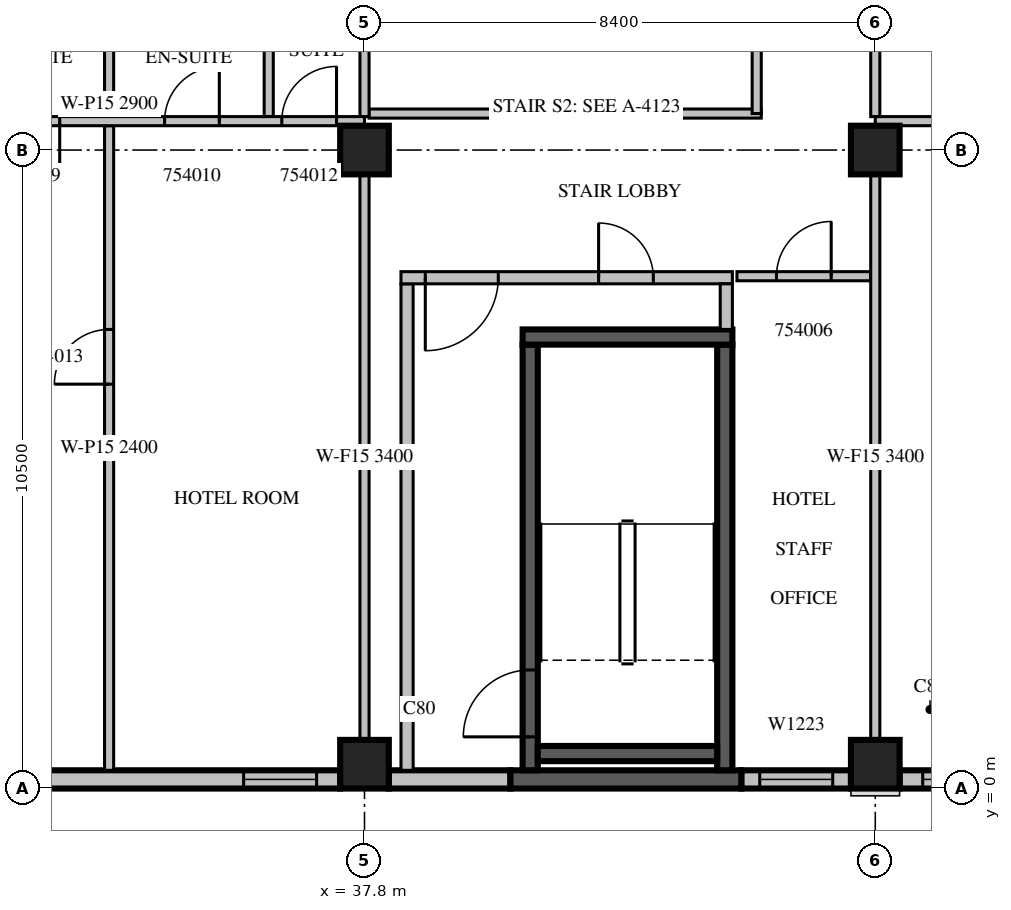
"""IFC4 building model, lengths in metres.
Left out: names, types, materials, properties, quantities, classifications, styles, units other than length and angle.
Written with IfcOpenShell. Run it as: python <this file> out.ifc"""

import sys

from ifc_helpers import new_model, si_unit, direction, frame, frame_2d, origin, origin_2d, place, context, subcontext, project, spatial, rectangle, extrude, source, transform, mapped, element, fill, save


model = new_model("IFC4")
c1 = context("Model", 3, precision=1e-05, world=origin(), true_north=direction((0.0, 1.0)))
c2 = subcontext(c1, "Body", "Model", "MODEL_VIEW")
j1 = project(units=[si_unit("LENGTHUNIT", "METRE"), si_unit("PLANEANGLEUNIT", "RADIAN")], contexts=[c1])
p1 = place(None, origin())
s1 = spatial("IfcSite", under=j1, at=p1, CompositionType="ELEMENT")
p2 = place(p1, origin())
s2 = spatial("IfcBuilding", under=s1, at=p2, CompositionType="ELEMENT")
p3 = place(p2, frame((0.0, 0.0, 238.6)))
s3 = spatial("IfcBuildingStorey", under=s2, at=p3, CompositionType="ELEMENT", Elevation=238.6)
m1 = source(origin(), c2, "Body", "SweptSolid", [
    extrude(rectangle(XDim=0.8, YDim=0.8, at=origin_2d()), origin(), (0.0, 0.0, 1.0), 3.8),
])
for number, where, z_axis, x_axis in (
    (1, (37.8, 0.4, 0.0), (0.0, 0.0, 1.0), (1.0, 0.0, 0.0)),
    (2, (46.2, 0.4, 0.0), (0.0, 0.0, 1.0), (1.0, 0.0, 0.0)),
    (3, (37.8, 10.5, 0.0), (0.0, 0.0, 1.0), (1.0, 0.0, 0.0)),
    (4, (46.2, 10.5, 0.0), (0.0, 0.0, 1.0), (1.0, 0.0, 0.0)),
):
    element("IfcColumn", number, at=place(p3, frame(where, z_axis=z_axis, x_axis=x_axis)), inside=s3, PredefinedType="COLUMN", context=c2, shape_type="MappedRepresentation", body=[
        mapped(m1, transform((0.0, 0.0, 0.0), scale=1.0)),
    ])
m2 = source(origin(), c2, "Body", "SweptSolid", [
    extrude(rectangle(XDim=7.6, YDim=0.3, at=frame_2d((3.8, 0.0))), origin(), (0.0, 0.0, 1.0), 3.4),
])
p4 = place(p3, frame((29.8, 0.15, 0.0), z_axis=(0.0, 0.0, 1.0), x_axis=(1.0, 0.0, 0.0)))
e5 = element("IfcWall", 5, at=p4, inside=s3, PredefinedType="STANDARD", context=c2, shape_type="MappedRepresentation", body=[
    mapped(m2, transform((0.0, 0.0, 0.0), scale=1.0)),
])
m3 = source(origin(), c2, "Body", "SweptSolid", [
    extrude(rectangle(XDim=1.2, YDim=2.3, at=frame_2d((0.6, 1.15))), frame((0.0, 0.16, 0.0), z_axis=(0.0, -1.0, 0.0), x_axis=(1.0, 0.0, 0.0)), (0.0, 0.0, 1.0), 0.32),
])
p5 = place(p4, frame((0.487, 0.0, 0.6)))
e6 = element("IfcOpeningElement", 6, at=p5, cuts=e5, PredefinedType="OPENING", context=c2, shape_type="MappedRepresentation", body=[
    mapped(m3, transform((0.0, 0.0, 0.0), scale=1.0)),
])
p6 = place(p4, frame((6.013, 0.0, 0.6)))
e7 = element("IfcOpeningElement", 7, at=p6, cuts=e5, PredefinedType="OPENING", context=c2, shape_type="MappedRepresentation", body=[
    mapped(m3, transform((0.0, 0.0, 0.0), scale=1.0)),
])
m4 = source(origin(), c2, "Body", "SweptSolid", [
    extrude(rectangle(XDim=2.0, YDim=0.3, at=frame_2d((1.0, 0.0))), origin(), (0.0, 0.0, 1.0), 3.4),
])
p7 = place(p3, frame((38.2, 0.15, 0.0), z_axis=(0.0, 0.0, 1.0), x_axis=(1.0, 0.0, 0.0)))
e8 = element("IfcWall", 8, at=p7, inside=s3, PredefinedType="STANDARD", context=c2, shape_type="MappedRepresentation", body=[
    mapped(m4, transform((0.0, 0.0, 0.0), scale=1.0)),
])
m5 = source(origin(), c2, "Body", "SweptSolid", [
    extrude(rectangle(XDim=3.8, YDim=0.3, at=frame_2d((1.9, 0.0))), origin(), (0.0, 0.0, 1.0), 3.4),
])
p8 = place(p3, frame((40.2, 0.15, 0.0), z_axis=(0.0, 0.0, 1.0), x_axis=(1.0, 0.0, 0.0)))
e9 = element("IfcWall", 9, at=p8, inside=s3, PredefinedType="SOLIDWALL", context=c2, shape_type="MappedRepresentation", body=[
    mapped(m5, transform((0.0, 0.0, 0.0), scale=1.0)),
])
m6 = source(origin(), c2, "Body", "SweptSolid", [
    extrude(rectangle(XDim=1.8, YDim=0.3, at=frame_2d((0.9, 0.0))), origin(), (0.0, 0.0, 1.0), 3.4),
])
p9 = place(p3, frame((44.0, 0.15, 0.0), z_axis=(0.0, 0.0, 1.0), x_axis=(1.0, 0.0, 0.0)))
e10 = element("IfcWall", 10, at=p9, inside=s3, PredefinedType="STANDARD", context=c2, shape_type="MappedRepresentation", body=[
    mapped(m6, transform((0.0, 0.0, 0.0), scale=1.0)),
])
p10 = place(p9, frame((0.3, 0.0, 0.6)))
e11 = element("IfcOpeningElement", 11, at=p10, cuts=e10, PredefinedType="OPENING", context=c2, shape_type="MappedRepresentation", body=[
    mapped(m3, transform((0.0, 0.0, 0.0), scale=1.0)),
])
m7 = source(origin(), c2, "Body", "SweptSolid", [
    extrude(rectangle(XDim=2.96, YDim=0.3, at=frame_2d((1.48, 0.0))), origin(), (0.0, 0.0, 1.0), 3.4),
])
p11 = place(p3, frame((46.6, 0.15, 0.0), z_axis=(0.0, 0.0, 1.0), x_axis=(1.0, 0.0, 0.0)))
e12 = element("IfcWall", 12, at=p11, inside=s3, PredefinedType="STANDARD", context=c2, shape_type="MappedRepresentation", body=[
    mapped(m7, transform((0.0, 0.0, 0.0), scale=1.0)),
])
m8 = source(origin(), c2, "Body", "SweptSolid", [
    extrude(rectangle(XDim=1.8, YDim=2.3, at=frame_2d((0.9, 1.15))), frame((0.0, 0.16, 0.0), z_axis=(0.0, -1.0, 0.0), x_axis=(1.0, 0.0, 0.0)), (0.0, 0.0, 1.0), 0.32),
])
p12 = place(p11, frame((0.38, 0.0, 0.6)))
e13 = element("IfcOpeningElement", 13, at=p12, cuts=e12, PredefinedType="OPENING", context=c2, shape_type="MappedRepresentation", body=[
    mapped(m8, transform((0.0, 0.0, 0.0), scale=1.0)),
])
m9 = source(origin(), c2, "Body", "SweptSolid", [
    extrude(rectangle(XDim=7.0, YDim=0.25, at=frame_2d((3.5, 0.0))), origin(), (0.0, 0.0, 1.0), 3.4),
])
p13 = place(p3, frame((40.525, 0.3, 0.0), z_axis=(0.0, 0.0, 1.0), x_axis=(0.0, 1.0, 0.0)))
e14 = element("IfcWall", 14, at=p13, inside=s3, PredefinedType="SOLIDWALL", context=c2, shape_type="MappedRepresentation", body=[
    mapped(m9, transform((0.0, 0.0, 0.0), scale=1.0)),
])
m10 = source(origin(), c2, "Body", "SweptSolid", [
    extrude(rectangle(XDim=1.1, YDim=2.1, at=frame_2d((0.55, 1.05))), frame((0.0, 0.135, 0.0), z_axis=(0.0, -1.0, 0.0), x_axis=(1.0, 0.0, 0.0)), (0.0, 0.0, 1.0), 0.27),
])
p14 = place(p13, frame((0.55, 0.0, 0.0)))
e15 = element("IfcOpeningElement", 15, at=p14, cuts=e14, PredefinedType="OPENING", context=c2, shape_type="MappedRepresentation", body=[
    mapped(m10, transform((0.0, 0.0, 0.0), scale=1.0)),
])
p15 = place(p3, frame((43.725, 0.3, 0.0), z_axis=(0.0, 0.0, 1.0), x_axis=(0.0, 1.0, 0.0)))
e16 = element("IfcWall", 16, at=p15, inside=s3, PredefinedType="SOLIDWALL", context=c2, shape_type="MappedRepresentation", body=[
    mapped(m9, transform((0.0, 0.0, 0.0), scale=1.0)),
])
m11 = source(origin(), c2, "Body", "SweptSolid", [
    extrude(rectangle(XDim=3.45, YDim=0.25, at=frame_2d((1.725, 0.0))), origin(), (0.0, 0.0, 1.0), 3.4),
])
p16 = place(p3, frame((40.4, 7.425, 0.0), z_axis=(0.0, 0.0, 1.0), x_axis=(1.0, 0.0, 0.0)))
e17 = element("IfcWall", 17, at=p16, inside=s3, PredefinedType="SOLIDWALL", context=c2, shape_type="MappedRepresentation", body=[
    mapped(m11, transform((0.0, 0.0, 0.0), scale=1.0)),
])
m12 = source(origin(), c2, "Body", "SweptSolid", [
    extrude(rectangle(XDim=2.95, YDim=0.25, at=frame_2d((1.475, 0.0))), origin(), (0.0, 0.0, 1.0), 3.4),
])
p17 = place(p3, frame((40.65, 0.575, 0.0), z_axis=(0.0, 0.0, 1.0), x_axis=(1.0, 0.0, 0.0)))
e18 = element("IfcWall", 18, at=p17, inside=s3, PredefinedType="SOLIDWALL", context=c2, shape_type="MappedRepresentation", body=[
    mapped(m12, transform((0.0, 0.0, 0.0), scale=1.0)),
])
m13 = source(origin(), c2, "Body", "SweptSolid", [
    extrude(rectangle(XDim=8.0, YDim=0.2, at=frame_2d((4.0, 0.0))), origin(), (0.0, 0.0, 1.0), 3.4),
])
p18 = place(p3, frame((38.5, 0.3, 0.0), z_axis=(0.0, 0.0, 1.0), x_axis=(0.0, 1.0, 0.0)))
e19 = element("IfcWall", 19, at=p18, inside=s3, PredefinedType="PARTITIONING", context=c2, shape_type="MappedRepresentation", body=[
    mapped(m13, transform((0.0, 0.0, 0.0), scale=1.0)),
])
m14 = source(origin(), c2, "Body", "SweptSolid", [
    extrude(rectangle(XDim=5.45, YDim=0.2, at=frame_2d((2.725, 0.0))), origin(), (0.0, 0.0, 1.0), 3.4),
])
p19 = place(p3, frame((38.4, 8.4, 0.0), z_axis=(0.0, 0.0, 1.0), x_axis=(1.0, 0.0, 0.0)))
e20 = element("IfcWall", 20, at=p19, inside=s3, PredefinedType="PARTITIONING", context=c2, shape_type="MappedRepresentation", body=[
    mapped(m14, transform((0.0, 0.0, 0.0), scale=1.0)),
])
m15 = source(origin(), c2, "Body", "SweptSolid", [
    extrude(rectangle(XDim=1.2, YDim=2.1, at=frame_2d((0.6, 1.05))), frame((0.0, 0.11, 0.0), z_axis=(0.0, -1.0, 0.0), x_axis=(1.0, 0.0, 0.0)), (0.0, 0.0, 1.0), 0.22),
])
p20 = place(p19, frame((0.4, 0.0, 0.0)))
e21 = element("IfcOpeningElement", 21, at=p20, cuts=e20, PredefinedType="OPENING", context=c2, shape_type="MappedRepresentation", body=[
    mapped(m15, transform((0.0, 0.0, 0.0), scale=1.0)),
])
m16 = source(origin(), c2, "Body", "SweptSolid", [
    extrude(rectangle(XDim=0.9, YDim=2.1, at=frame_2d((0.45, 1.05))), frame((0.0, 0.11, 0.0), z_axis=(0.0, -1.0, 0.0), x_axis=(1.0, 0.0, 0.0)), (0.0, 0.0, 1.0), 0.22),
])
p21 = place(p19, frame((3.25, 0.0, 0.0)))
e22 = element("IfcOpeningElement", 22, at=p21, cuts=e20, PredefinedType="OPENING", context=c2, shape_type="MappedRepresentation", body=[
    mapped(m16, transform((0.0, 0.0, 0.0), scale=1.0)),
])
m17 = source(origin(), c2, "Body", "SweptSolid", [
    extrude(rectangle(XDim=0.75, YDim=0.2, at=frame_2d((0.375, 0.0))), origin(), (0.0, 0.0, 1.0), 3.4),
])
p22 = place(p3, frame((43.75, 7.55, 0.0), z_axis=(0.0, 0.0, 1.0), x_axis=(0.0, 1.0, 0.0)))
e23 = element("IfcWall", 23, at=p22, inside=s3, PredefinedType="PARTITIONING", context=c2, shape_type="MappedRepresentation", body=[
    mapped(m17, transform((0.0, 0.0, 0.0), scale=1.0)),
])
m18 = source(origin(), c2, "Body", "SweptSolid", [
    extrude(rectangle(XDim=6.45, YDim=0.15, at=frame_2d((3.225, 0.0))), origin(), (0.0, 0.0, 1.0), 3.4),
])
p23 = place(p3, frame((37.875, 11.1, 0.0), z_axis=(0.0, 0.0, 1.0), x_axis=(1.0, 0.0, 0.0)))
e24 = element("IfcWall", 24, at=p23, inside=s3, PredefinedType="PARTITIONING", context=c2, shape_type="MappedRepresentation", body=[
    mapped(m18, transform((0.0, 0.0, 0.0), scale=1.0)),
])
p24 = place(p3, frame((44.25, 11.1, 0.0), z_axis=(0.0, 0.0, 1.0), x_axis=(0.0, 1.0, 0.0)))
e25 = element("IfcWall", 25, at=p24, inside=s3, PredefinedType="PARTITIONING", context=c2, shape_type="SweptSolid", body=[
    extrude(rectangle(XDim=3.675, YDim=0.15, at=frame_2d((1.837, 0.0))), origin(), (0.0, 0.0, 1.0), 3.4),
])
m19 = source(origin(), c2, "Body", "SweptSolid", [
    extrude(rectangle(XDim=2.2, YDim=0.15, at=frame_2d((1.1, 0.0))), origin(), (0.0, 0.0, 1.0), 3.4),
])
p25 = place(p3, frame((46.125, 8.425, 0.0), z_axis=(0.0, 0.0, 1.0), x_axis=(-1.0, 0.0, 0.0)))
e26 = element("IfcWall", 26, at=p25, inside=s3, PredefinedType="PARTITIONING", context=c2, shape_type="MappedRepresentation", body=[
    mapped(m19, transform((0.0, 0.0, 0.0), scale=1.0)),
])
m20 = source(origin(), c2, "Body", "SweptSolid", [
    extrude(rectangle(XDim=0.9, YDim=2.1, at=frame_2d((0.45, 1.05))), frame((0.0, 0.085, 0.0), z_axis=(0.0, -1.0, 0.0), x_axis=(1.0, 0.0, 0.0)), (0.0, 0.0, 1.0), 0.17),
])
p26 = place(p25, frame((0.65, 0.0, 0.0)))
e27 = element("IfcOpeningElement", 27, at=p26, cuts=e26, PredefinedType="OPENING", context=c2, shape_type="MappedRepresentation", body=[
    mapped(m20, transform((0.0, 0.0, 0.0), scale=1.0)),
])
m21 = source(origin(), c2, "Body", "SweptSolid", [
    extrude(rectangle(XDim=10.6, YDim=0.15, at=frame_2d((5.3, 0.0))), origin(), (0.0, 0.0, 1.0), 2.4),
])
p27 = place(p3, frame((33.6, 0.3, 0.0), z_axis=(0.0, 0.0, 1.0), x_axis=(0.0, 1.0, 0.0)))
e28 = element("IfcWall", 28, at=p27, inside=s3, PredefinedType="PARTITIONING", context=c2, shape_type="MappedRepresentation", body=[
    mapped(m21, transform((0.0, 0.0, 0.0), scale=1.0)),
])
p28 = place(p27, frame((6.35, 0.0, 0.0)))
e29 = element("IfcOpeningElement", 29, at=p28, cuts=e28, PredefinedType="OPENING", context=c2, shape_type="MappedRepresentation", body=[
    mapped(m20, transform((0.0, 0.0, 0.0), scale=1.0)),
])
p29 = place(p3, frame((33.6, 11.05, 0.0), z_axis=(0.0, 0.0, 1.0), x_axis=(0.0, 1.0, 0.0)))
e30 = element("IfcWall", 30, at=p29, inside=s3, PredefinedType="PARTITIONING", context=c2, shape_type="SweptSolid", body=[
    extrude(rectangle(XDim=3.65, YDim=0.15, at=frame_2d((1.825, 0.0))), origin(), (0.0, 0.0, 1.0), 2.9),
])
m22 = source(origin(), c2, "Body", "SweptSolid", [
    extrude(rectangle(XDim=3.65, YDim=0.15, at=frame_2d((1.825, 0.0))), origin(), (0.0, 0.0, 1.0), 3.4),
])
p30 = place(p3, frame((36.225, 11.05, 0.0), z_axis=(0.0, 0.0, 1.0), x_axis=(0.0, 1.0, 0.0)))
e31 = element("IfcWall", 31, at=p30, inside=s3, PredefinedType="PARTITIONING", context=c2, shape_type="MappedRepresentation", body=[
    mapped(m22, transform((0.0, 0.0, 0.0), scale=1.0)),
])
m23 = source(origin(), c2, "Body", "SweptSolid", [
    extrude(rectangle(XDim=9.302, YDim=0.15, at=frame_2d((4.651, 0.0))), origin(), (0.0, 0.0, 1.0), 3.4),
])
p31 = place(p3, frame((37.8, 0.799, 0.0), z_axis=(0.0, 0.0, 1.0), x_axis=(0.0, 1.0, 0.0)))
e32 = element("IfcWall", 32, at=p31, inside=s3, PredefinedType="PARTITIONING", context=c2, shape_type="MappedRepresentation", body=[
    mapped(m23, transform((0.0, 0.0, 0.0), scale=1.0)),
])
p32 = place(p3, frame((37.8, 11.05, 0.0), z_axis=(0.0, 0.0, 1.0), x_axis=(0.0, 1.0, 0.0)))
e33 = element("IfcWall", 33, at=p32, inside=s3, PredefinedType="PARTITIONING", context=c2, shape_type="MappedRepresentation", body=[
    mapped(m22, transform((0.0, 0.0, 0.0), scale=1.0)),
])
m24 = source(origin(), c2, "Body", "SweptSolid", [
    extrude(rectangle(XDim=8.4, YDim=0.15, at=frame_2d((4.2, 0.0))), origin(), (0.0, 0.0, 1.0), 2.9),
])
p33 = place(p3, frame((37.8, 10.975, 0.0), z_axis=(0.0, 0.0, 1.0), x_axis=(-1.0, 0.0, 0.0)))
e34 = element("IfcWall", 34, at=p33, inside=s3, PredefinedType="PARTITIONING", context=c2, shape_type="MappedRepresentation", body=[
    mapped(m24, transform((0.0, 0.0, 0.0), scale=1.0)),
])
p34 = place(p33, frame((7.0, 0.0, 0.0)))
e35 = element("IfcOpeningElement", 35, at=p34, cuts=e34, PredefinedType="OPENING", context=c2, shape_type="MappedRepresentation", body=[
    mapped(m20, transform((0.0, 0.0, 0.0), scale=1.0)),
])
p35 = place(p33, frame((5.013, 0.0, 0.0)))
e36 = element("IfcOpeningElement", 36, at=p35, cuts=e34, PredefinedType="OPENING", context=c2, shape_type="MappedRepresentation", body=[
    mapped(m20, transform((0.0, 0.0, 0.0), scale=1.0)),
])
p36 = place(p33, frame((2.388, 0.0, 0.0)))
e37 = element("IfcOpeningElement", 37, at=p36, cuts=e34, PredefinedType="OPENING", context=c2, shape_type="MappedRepresentation", body=[
    mapped(m20, transform((0.0, 0.0, 0.0), scale=1.0)),
])
p37 = place(p33, frame((0.46, 0.0, 0.0)))
e38 = element("IfcOpeningElement", 38, at=p37, cuts=e34, PredefinedType="OPENING", context=c2, shape_type="MappedRepresentation", body=[
    mapped(m20, transform((0.0, 0.0, 0.0), scale=1.0)),
])
p38 = place(p3, frame((46.2, 0.799, 0.0), z_axis=(0.0, 0.0, 1.0), x_axis=(0.0, 1.0, 0.0)))
e39 = element("IfcWall", 39, at=p38, inside=s3, PredefinedType="PARTITIONING", context=c2, shape_type="MappedRepresentation", body=[
    mapped(m23, transform((0.0, 0.0, 0.0), scale=1.0)),
])
p39 = place(p3, frame((46.2, 11.05, 0.0), z_axis=(0.0, 0.0, 1.0), x_axis=(0.0, 1.0, 0.0)))
e40 = element("IfcWall", 40, at=p39, inside=s3, PredefinedType="PARTITIONING", context=c2, shape_type="MappedRepresentation", body=[
    mapped(m22, transform((0.0, 0.0, 0.0), scale=1.0)),
])
m25 = source(origin(), c2, "Body", "SweptSolid", [
    extrude(rectangle(XDim=7.26, YDim=0.15, at=frame_2d((3.63, 0.0))), origin(), (0.0, 0.0, 1.0), 3.4),
])
p40 = place(p3, frame((53.46, 10.975, 0.0), z_axis=(0.0, 0.0, 1.0), x_axis=(-1.0, 0.0, 0.0)))
e41 = element("IfcWall", 41, at=p40, inside=s3, PredefinedType="PARTITIONING", context=c2, shape_type="MappedRepresentation", body=[
    mapped(m25, transform((0.0, 0.0, 0.0), scale=1.0)),
])
m26 = source(origin(), c2, "Body", "SweptSolid", [
    extrude(rectangle(XDim=1.6, YDim=2.1, at=frame_2d((0.8, 1.05))), frame((0.0, 0.085, 0.0), z_axis=(0.0, -1.0, 0.0), x_axis=(1.0, 0.0, 0.0)), (0.0, 0.0, 1.0), 0.17),
])
p41 = place(p40, frame((4.491, 0.0, 0.0)))
e42 = element("IfcOpeningElement", 42, at=p41, cuts=e41, PredefinedType="OPENING", context=c2, shape_type="MappedRepresentation", body=[
    mapped(m26, transform((0.0, 0.0, 0.0), scale=1.0)),
])
m27 = source(origin(), c2, "Body", "SweptSolid", [
    extrude(rectangle(XDim=1.0, YDim=2.1, at=frame_2d((0.5, 1.05))), frame((0.0, 0.085, 0.0), z_axis=(0.0, -1.0, 0.0), x_axis=(1.0, 0.0, 0.0)), (0.0, 0.0, 1.0), 0.17),
])
p42 = place(p40, frame((2.372, 0.0, 0.0)))
e43 = element("IfcOpeningElement", 43, at=p42, cuts=e41, PredefinedType="OPENING", context=c2, shape_type="MappedRepresentation", body=[
    mapped(m27, transform((0.0, 0.0, 0.0), scale=1.0)),
])
m28 = source(origin(), c2, "Body", "SweptSolid", [
    extrude(rectangle(XDim=1.2, YDim=2.3, at=frame_2d((0.6, 1.15))), frame((0.0, 0.03, 0.0), z_axis=(0.0, -1.0, 0.0), x_axis=(1.0, 0.0, 0.0)), (0.0, 0.0, 1.0), 0.06),
])
p43 = place(p6, origin())
e44 = element("IfcWindow", 44, at=p43, inside=s3, PartitioningType="SINGLE_PANEL", PredefinedType="WINDOW", context=c2, shape_type="MappedRepresentation", body=[
    mapped(m28, transform((0.0, 0.0, 0.0), scale=1.0)),
])
fill(e7, e44)
p44 = place(p10, origin())
e45 = element("IfcWindow", 45, at=p44, inside=s3, PartitioningType="SINGLE_PANEL", PredefinedType="WINDOW", context=c2, shape_type="MappedRepresentation", body=[
    mapped(m28, transform((0.0, 0.0, 0.0), scale=1.0)),
])
fill(e11, e45)
m29 = source(origin(), c2, "Body", "SweptSolid", [
    extrude(rectangle(XDim=1.8, YDim=2.3, at=frame_2d((0.9, 1.15))), frame((0.0, 0.03, 0.0), z_axis=(0.0, -1.0, 0.0), x_axis=(1.0, 0.0, 0.0)), (0.0, 0.0, 1.0), 0.06),
])
p45 = place(p12, origin())
e46 = element("IfcWindow", 46, at=p45, inside=s3, PartitioningType="SINGLE_PANEL", PredefinedType="WINDOW", context=c2, shape_type="MappedRepresentation", body=[
    mapped(m29, transform((0.0, 0.0, 0.0), scale=1.0)),
])
fill(e13, e46)
m30 = source(origin(), c2, "Body", "SweptSolid", [
    extrude(rectangle(XDim=1.1, YDim=2.1, at=frame_2d((0.55, 1.05))), frame((0.0, 0.025, 0.0), z_axis=(0.0, -1.0, 0.0), x_axis=(1.0, 0.0, 0.0)), (0.0, 0.0, 1.0), 0.05),
])
p46 = place(p14, origin())
e47 = element("IfcDoor", 47, at=p46, inside=s3, OperationType="SINGLE_SWING_LEFT", PredefinedType="DOOR", context=c2, shape_type="MappedRepresentation", body=[
    mapped(m30, transform((0.0, 0.0, 0.0), scale=1.0)),
])
fill(e15, e47)
m31 = source(origin(), c2, "Body", "SweptSolid", [
    extrude(rectangle(XDim=1.2, YDim=2.1, at=frame_2d((0.6, 1.05))), frame((0.0, 0.025, 0.0), z_axis=(0.0, -1.0, 0.0), x_axis=(1.0, 0.0, 0.0)), (0.0, 0.0, 1.0), 0.05),
])
p47 = place(p20, origin())
e48 = element("IfcDoor", 48, at=p47, inside=s3, OperationType="SINGLE_SWING_RIGHT", PredefinedType="DOOR", context=c2, shape_type="MappedRepresentation", body=[
    mapped(m31, transform((0.0, 0.0, 0.0), scale=1.0)),
])
fill(e21, e48)
m32 = source(origin(), c2, "Body", "SweptSolid", [
    extrude(rectangle(XDim=0.9, YDim=2.1, at=frame_2d((0.45, 1.05))), frame((0.0, 0.025, 0.0), z_axis=(0.0, -1.0, 0.0), x_axis=(1.0, 0.0, 0.0)), (0.0, 0.0, 1.0), 0.05),
])
p48 = place(p21, origin())
e49 = element("IfcDoor", 49, at=p48, inside=s3, OperationType="SINGLE_SWING_LEFT", PredefinedType="DOOR", context=c2, shape_type="MappedRepresentation", body=[
    mapped(m32, transform((0.0, 0.0, 0.0), scale=1.0)),
])
fill(e22, e49)
p49 = place(p26, origin())
e50 = element("IfcDoor", 50, at=p49, inside=s3, OperationType="SINGLE_SWING_RIGHT", PredefinedType="DOOR", context=c2, shape_type="MappedRepresentation", body=[
    mapped(m32, transform((0.0, 0.0, 0.0), scale=1.0)),
])
fill(e27, e50)
p50 = place(p35, origin())
e51 = element("IfcDoor", 51, at=p50, inside=s3, OperationType="SINGLE_SWING_LEFT", PredefinedType="DOOR", context=c2, shape_type="MappedRepresentation", body=[
    mapped(m32, transform((0.0, 0.0, 0.0), scale=1.0)),
])
fill(e36, e51)
p51 = place(p36, origin())
e52 = element("IfcDoor", 52, at=p51, inside=s3, OperationType="SINGLE_SWING_RIGHT", PredefinedType="DOOR", context=c2, shape_type="MappedRepresentation", body=[
    mapped(m32, transform((0.0, 0.0, 0.0), scale=1.0)),
])
fill(e37, e52)
p52 = place(p37, origin())
e53 = element("IfcDoor", 53, at=p52, inside=s3, OperationType="SINGLE_SWING_RIGHT", PredefinedType="DOOR", context=c2, shape_type="MappedRepresentation", body=[
    mapped(m32, transform((0.0, 0.0, 0.0), scale=1.0)),
])
fill(e38, e53)
p53 = place(p28, origin())
e54 = element("IfcDoor", 54, at=p53, inside=s3, OperationType="SINGLE_SWING_LEFT", PredefinedType="DOOR", context=c2, shape_type="MappedRepresentation", body=[
    mapped(m32, transform((0.0, 0.0, 0.0), scale=1.0)),
])
fill(e29, e54)
save(model, sys.argv[1])
